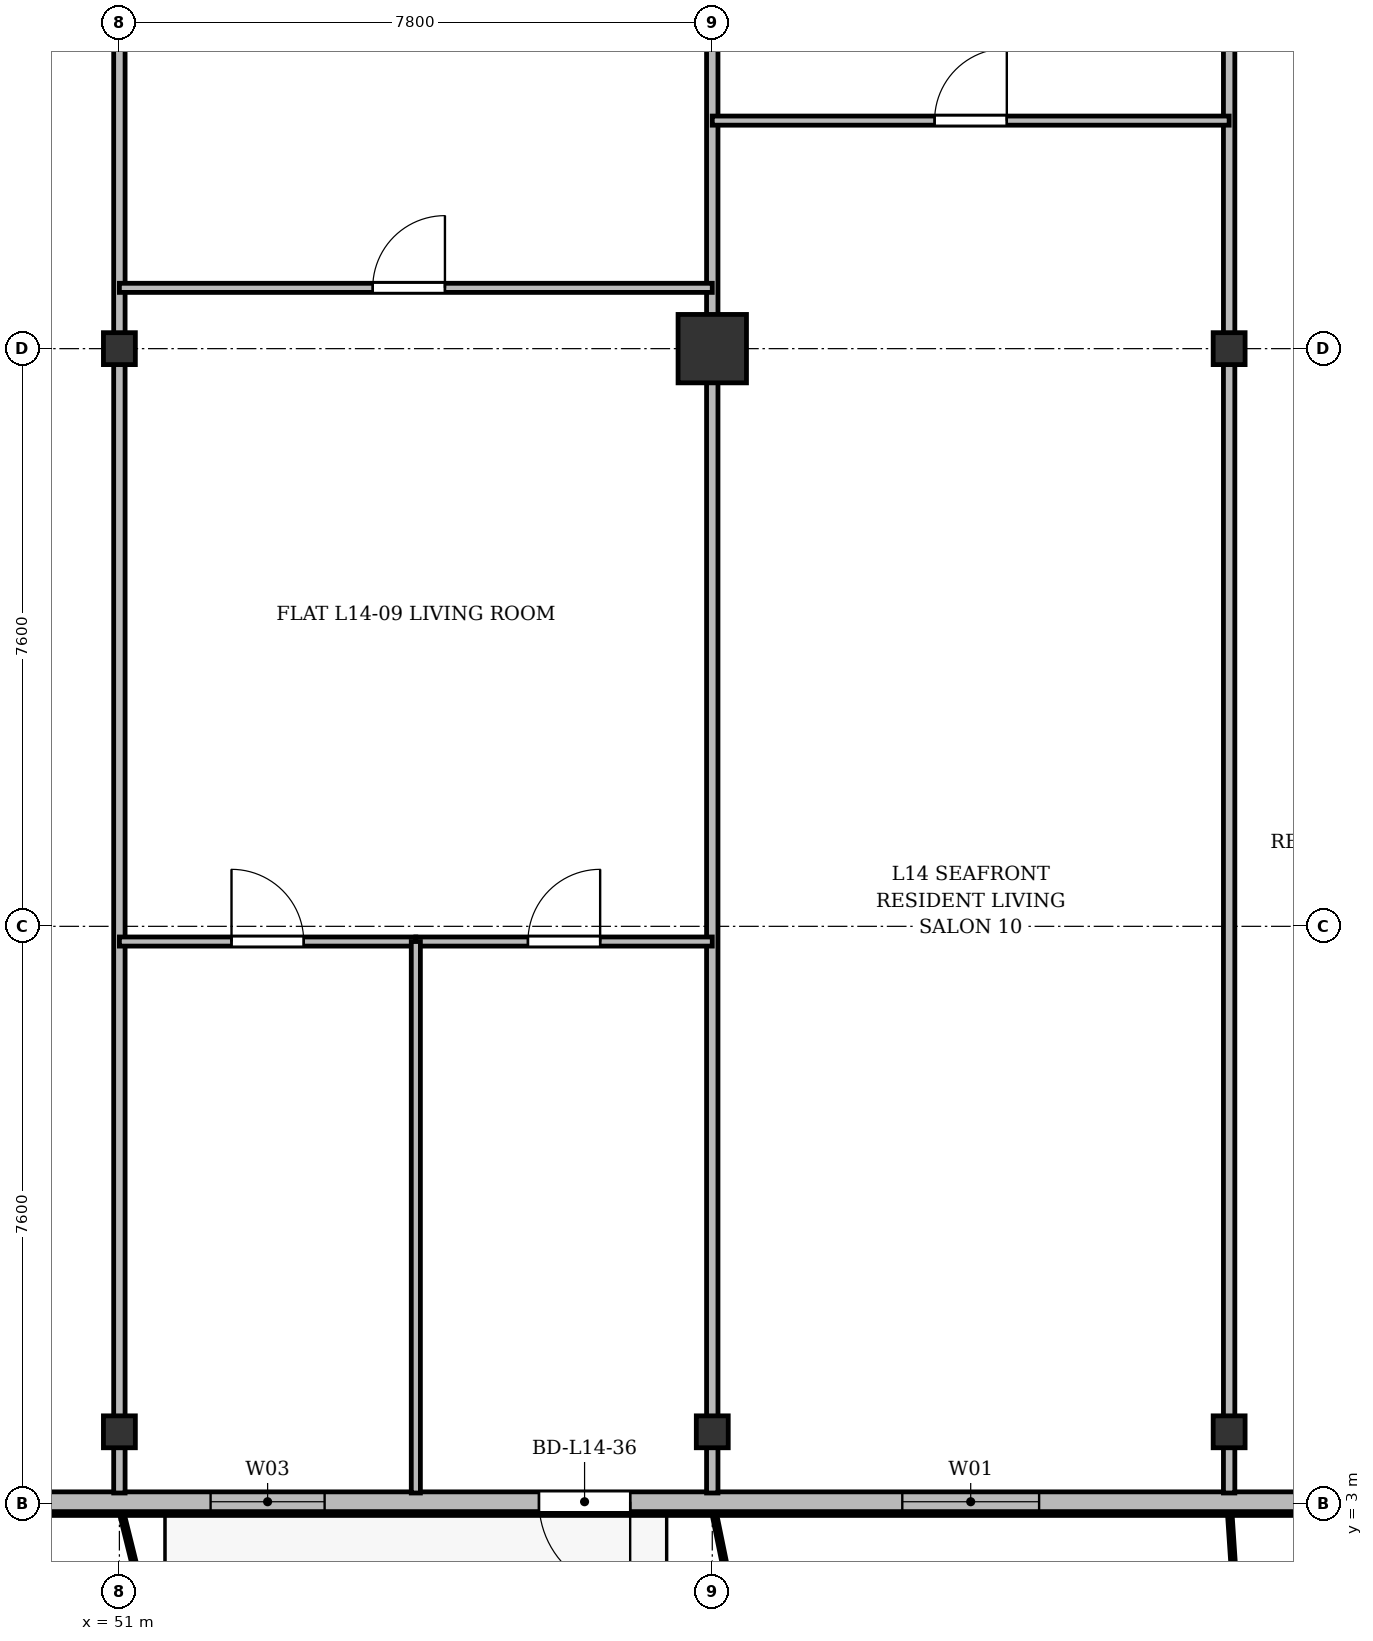
"""IFC4 building model, lengths in metres.
Left out: names, types, materials, properties, quantities, classifications, styles, units other than length and angle.
Written with IfcOpenShell. Run it as: python <this file> out.ifc"""

import sys

from ifc_helpers import new_model, si_unit, direction, frame, frame_2d, origin, origin_2d, place, context, subcontext, project, spatial, rectangle, i_section, extrude, source, transform, mapped, element, fill, save


model = new_model("IFC4")
c1 = context("Model", 3, precision=1e-05, world=origin(), true_north=direction((0.0, 1.0)))
c2 = subcontext(c1, "Body", "Model", "MODEL_VIEW")
j1 = project(units=[si_unit("LENGTHUNIT", "METRE"), si_unit("PLANEANGLEUNIT", "RADIAN")], contexts=[c1])
p1 = place(None, origin())
s1 = spatial("IfcSite", under=j1, at=p1, CompositionType="ELEMENT")
p2 = place(p1, origin())
s2 = spatial("IfcBuilding", under=s1, at=p2, CompositionType="ELEMENT")
p3 = place(p2, frame((0.0, 0.0, 55.9)))
s3 = spatial("IfcBuildingStorey", under=s2, at=p3, CompositionType="ELEMENT", Elevation=55.9)
m1 = source(origin(), c2, "Body", "SweptSolid", [
    extrude(i_section(OverallWidth=0.42, OverallDepth=0.42, WebThickness=0.026, FlangeThickness=0.04, at=origin_2d()), origin(), (0.0, 0.0, 1.0), 3.6),
])
for number, where, z_axis, x_axis in (
    (1, (51.0, 3.95, 0.0), (0.0, 0.0, 1.0), (1.0, 0.0, 0.0)),
    (2, (51.0, 18.2, 0.0), (0.0, 0.0, 1.0), (1.0, 0.0, 0.0)),
    (3, (58.8, 3.95, 0.0), (0.0, 0.0, 1.0), (1.0, 0.0, 0.0)),
):
    element("IfcColumn", number, at=place(p3, frame(where, z_axis=z_axis, x_axis=x_axis)), inside=s3, PredefinedType="COLUMN", context=c2, shape_type="MappedRepresentation", body=[
        mapped(m1, transform((0.0, 0.0, 0.0), x_axis=(1.0, 0.0, 0.0), y_axis=(0.0, 1.0, 0.0), z_axis=(0.0, 0.0, 1.0), scale=1.0)),
    ])
m2 = source(origin(), c2, "Body", "SweptSolid", [
    extrude(rectangle(XDim=0.9, YDim=0.9, at=origin_2d()), origin(), (0.0, 0.0, 1.0), 3.6),
])
p4 = place(p3, frame((58.8, 18.2, 0.0), z_axis=(0.0, 0.0, 1.0), x_axis=(1.0, 0.0, 0.0)))
e4 = element("IfcColumn", 4, at=p4, inside=s3, PredefinedType="COLUMN", context=c2, shape_type="MappedRepresentation", body=[
    mapped(m2, transform((0.0, 0.0, 0.0), x_axis=(1.0, 0.0, 0.0), y_axis=(0.0, 1.0, 0.0), z_axis=(0.0, 0.0, 1.0), scale=1.0)),
])
for number, where, z_axis, x_axis in (
    (5, (65.6, 3.95, 0.0), (0.0, 0.0, 1.0), (1.0, 0.0, 0.0)),
    (6, (65.6, 18.2, 0.0), (0.0, 0.0, 1.0), (1.0, 0.0, 0.0)),
):
    element("IfcColumn", number, at=place(p3, frame(where, z_axis=z_axis, x_axis=x_axis)), inside=s3, PredefinedType="COLUMN", context=c2, shape_type="MappedRepresentation", body=[
        mapped(m1, transform((0.0, 0.0, 0.0), x_axis=(1.0, 0.0, 0.0), y_axis=(0.0, 1.0, 0.0), z_axis=(0.0, 0.0, 1.0), scale=1.0)),
    ])
p5 = place(p3, frame((66.9, 3.03, 0.0), z_axis=(0.0, 0.0, 1.0), x_axis=(-1.0, 0.0, 0.0)))
e7 = element("IfcWall", 7, at=p5, inside=s3, PredefinedType="SOLIDWALL", context=c2, shape_type="SweptSolid", body=[
    extrude(rectangle(XDim=59.4, YDim=0.26, at=frame_2d((29.7, 0.0))), origin(), (0.0, 0.0, 1.0), 3.34),
])
p6 = place(p5, frame((3.8, 0.0, 0.9)))
e8 = element("IfcOpeningElement", 8, at=p6, cuts=e7, PredefinedType="OPENING", context=c2, shape_type="SweptSolid", body=[
    extrude(rectangle(XDim=1.8, YDim=1.8, at=frame_2d((0.9, 0.9))), frame((0.0, 0.14, 0.0), z_axis=(0.0, -1.0, 0.0), x_axis=(1.0, 0.0, 0.0)), (0.0, 0.0, 1.0), 0.28),
])
p7 = place(p5, frame((9.18, 0.0, 0.0)))
e9 = element("IfcOpeningElement", 9, at=p7, cuts=e7, PredefinedType="OPENING", context=c2, shape_type="SweptSolid", body=[
    extrude(rectangle(XDim=1.2, YDim=2.2, at=frame_2d((0.6, 1.1))), frame((0.0, 0.14, 0.0), z_axis=(0.0, -1.0, 0.0), x_axis=(1.0, 0.0, 0.0)), (0.0, 0.0, 1.0), 0.28),
])
p8 = place(p5, frame((13.2, 0.0, 0.9)))
e10 = element("IfcOpeningElement", 10, at=p8, cuts=e7, PredefinedType="OPENING", context=c2, shape_type="SweptSolid", body=[
    extrude(rectangle(XDim=1.5, YDim=1.75, at=frame_2d((0.75, 0.875))), frame((0.0, 0.14, 0.0), z_axis=(0.0, -1.0, 0.0), x_axis=(1.0, 0.0, 0.0)), (0.0, 0.0, 1.0), 0.28),
])
p9 = place(p5, frame((18.5, 0.0, 0.9)))
e11 = element("IfcOpeningElement", 11, at=p9, cuts=e7, PredefinedType="OPENING", context=c2, shape_type="SweptSolid", body=[
    extrude(rectangle(XDim=2.0, YDim=1.95, at=frame_2d((1.0, 0.975))), frame((0.0, 0.14, 0.0), z_axis=(0.0, -1.0, 0.0), x_axis=(1.0, 0.0, 0.0)), (0.0, 0.0, 1.0), 0.28),
])
p10 = place(p5, frame((24.175, 0.0, 0.9)))
e12 = element("IfcOpeningElement", 12, at=p10, cuts=e7, PredefinedType="OPENING", context=c2, shape_type="SweptSolid", body=[
    extrude(rectangle(XDim=1.65, YDim=1.85, at=frame_2d((0.825, 0.925))), frame((0.0, 0.14, 0.0), z_axis=(0.0, -1.0, 0.0), x_axis=(1.0, 0.0, 0.0)), (0.0, 0.0, 1.0), 0.28),
])
p11 = place(p5, frame((28.3, 0.0, 0.9)))
e13 = element("IfcOpeningElement", 13, at=p11, cuts=e7, PredefinedType="OPENING", context=c2, shape_type="SweptSolid", body=[
    extrude(rectangle(XDim=1.8, YDim=1.8, at=frame_2d((0.9, 0.9))), frame((0.0, 0.14, 0.0), z_axis=(0.0, -1.0, 0.0), x_axis=(1.0, 0.0, 0.0)), (0.0, 0.0, 1.0), 0.28),
])
p12 = place(p5, frame((32.8, 0.0, 0.9)))
e14 = element("IfcOpeningElement", 14, at=p12, cuts=e7, PredefinedType="OPENING", context=c2, shape_type="SweptSolid", body=[
    extrude(rectangle(XDim=2.2, YDim=1.8, at=frame_2d((1.1, 0.9))), frame((0.0, 0.14, 0.0), z_axis=(0.0, -1.0, 0.0), x_axis=(1.0, 0.0, 0.0)), (0.0, 0.0, 1.0), 0.28),
])
p13 = place(p5, frame((40.301, 0.0, 0.0)))
e15 = element("IfcOpeningElement", 15, at=p13, cuts=e7, PredefinedType="OPENING", context=c2, shape_type="SweptSolid", body=[
    extrude(rectangle(XDim=1.2, YDim=2.2, at=frame_2d((0.6, 1.1))), frame((0.0, 0.14, 0.0), z_axis=(0.0, -1.0, 0.0), x_axis=(1.0, 0.0, 0.0)), (0.0, 0.0, 1.0), 0.28),
])
p14 = place(p5, frame((46.4, 0.0, 0.9)))
e16 = element("IfcOpeningElement", 16, at=p14, cuts=e7, PredefinedType="OPENING", context=c2, shape_type="SweptSolid", body=[
    extrude(rectangle(XDim=2.0, YDim=1.95, at=frame_2d((1.0, 0.975))), frame((0.0, 0.14, 0.0), z_axis=(0.0, -1.0, 0.0), x_axis=(1.0, 0.0, 0.0)), (0.0, 0.0, 1.0), 0.28),
])
p15 = place(p5, frame((53.136, 0.0, 0.0)))
e17 = element("IfcOpeningElement", 17, at=p15, cuts=e7, PredefinedType="OPENING", context=c2, shape_type="SweptSolid", body=[
    extrude(rectangle(XDim=1.2, YDim=2.2, at=frame_2d((0.6, 1.1))), frame((0.0, 0.14, 0.0), z_axis=(0.0, -1.0, 0.0), x_axis=(1.0, 0.0, 0.0)), (0.0, 0.0, 1.0), 0.28),
])
p16 = place(p5, frame((55.5, 0.0, 0.9)))
e18 = element("IfcOpeningElement", 18, at=p16, cuts=e7, PredefinedType="OPENING", context=c2, shape_type="SweptSolid", body=[
    extrude(rectangle(XDim=1.8, YDim=1.8, at=frame_2d((0.9, 0.9))), frame((0.0, 0.14, 0.0), z_axis=(0.0, -1.0, 0.0), x_axis=(1.0, 0.0, 0.0)), (0.0, 0.0, 1.0), 0.28),
])
for number, where, z_axis, x_axis in (
    (19, (51.0, 3.145, 0.0), (0.0, 0.0, 1.0), (0.0, 1.0, 0.0)),
    (20, (58.8, 3.145, 0.0), (0.0, 0.0, 1.0), (0.0, 1.0, 0.0)),
    (21, (65.6, 3.145, 0.0), (0.0, 0.0, 1.0), (0.0, 1.0, 0.0)),
):
    element("IfcWall", number, at=place(p3, frame(where, z_axis=z_axis, x_axis=x_axis)), inside=s3, PredefinedType="PARTITIONING", context=c2, shape_type="SweptSolid", body=[
        extrude(rectangle(XDim=24.455, YDim=0.15, at=frame_2d((12.228, 0.0))), origin(), (0.0, 0.0, 1.0), 2.752),
    ])
p17 = place(p3, frame((51.0, 19.0, 0.0), z_axis=(0.0, 0.0, 1.0), x_axis=(1.0, 0.0, 0.0)))
e22 = element("IfcWall", 22, at=p17, inside=s3, PredefinedType="PARTITIONING", context=c2, shape_type="SweptSolid", body=[
    extrude(rectangle(XDim=7.8, YDim=0.12, at=frame_2d((3.9, 0.0))), origin(), (0.0, 0.0, 1.0), 2.752),
])
p18 = place(p17, frame((3.333, 0.0, 0.0)))
e23 = element("IfcOpeningElement", 23, at=p18, cuts=e22, PredefinedType="OPENING", context=c2, shape_type="SweptSolid", body=[
    extrude(rectangle(XDim=0.95, YDim=2.15, at=frame_2d((0.475, 1.075))), frame((0.0, 0.07, 0.0), z_axis=(0.0, -1.0, 0.0), x_axis=(1.0, 0.0, 0.0)), (0.0, 0.0, 1.0), 0.14),
])
p19 = place(p3, frame((51.0, 10.4, 0.0), z_axis=(0.0, 0.0, 1.0), x_axis=(1.0, 0.0, 0.0)))
e24 = element("IfcWall", 24, at=p19, inside=s3, PredefinedType="PARTITIONING", context=c2, shape_type="SweptSolid", body=[
    extrude(rectangle(XDim=3.9, YDim=0.12, at=frame_2d((1.95, 0.0))), origin(), (0.0, 0.0, 1.0), 2.752),
])
p20 = place(p19, frame((1.475, 0.0, 0.0)))
e25 = element("IfcOpeningElement", 25, at=p20, cuts=e24, PredefinedType="OPENING", context=c2, shape_type="SweptSolid", body=[
    extrude(rectangle(XDim=0.95, YDim=2.15, at=frame_2d((0.475, 1.075))), frame((0.0, 0.07, 0.0), z_axis=(0.0, -1.0, 0.0), x_axis=(1.0, 0.0, 0.0)), (0.0, 0.0, 1.0), 0.14),
])
p21 = place(p3, frame((54.9, 10.4, 0.0), z_axis=(0.0, 0.0, 1.0), x_axis=(1.0, 0.0, 0.0)))
e26 = element("IfcWall", 26, at=p21, inside=s3, PredefinedType="PARTITIONING", context=c2, shape_type="SweptSolid", body=[
    extrude(rectangle(XDim=3.9, YDim=0.12, at=frame_2d((1.95, 0.0))), origin(), (0.0, 0.0, 1.0), 2.752),
])
p22 = place(p21, frame((1.475, 0.0, 0.0)))
e27 = element("IfcOpeningElement", 27, at=p22, cuts=e26, PredefinedType="OPENING", context=c2, shape_type="SweptSolid", body=[
    extrude(rectangle(XDim=0.95, YDim=2.15, at=frame_2d((0.475, 1.075))), frame((0.0, 0.07, 0.0), z_axis=(0.0, -1.0, 0.0), x_axis=(1.0, 0.0, 0.0)), (0.0, 0.0, 1.0), 0.14),
])
p23 = place(p3, frame((54.9, 3.145, 0.0), z_axis=(0.0, 0.0, 1.0), x_axis=(0.0, 1.0, 0.0)))
e28 = element("IfcWall", 28, at=p23, inside=s3, PredefinedType="PARTITIONING", context=c2, shape_type="SweptSolid", body=[
    extrude(rectangle(XDim=7.255, YDim=0.12, at=frame_2d((3.627, 0.0))), origin(), (0.0, 0.0, 1.0), 2.69),
])
p24 = place(p3, frame((58.8, 21.2, 0.0), z_axis=(0.0, 0.0, 1.0), x_axis=(1.0, 0.0, 0.0)))
e29 = element("IfcWall", 29, at=p24, inside=s3, PredefinedType="PARTITIONING", context=c2, shape_type="SweptSolid", body=[
    extrude(rectangle(XDim=6.8, YDim=0.12, at=frame_2d((3.4, 0.0))), origin(), (0.0, 0.0, 1.0), 2.752),
])
p25 = place(p24, frame((2.925, 0.0, 0.0)))
e30 = element("IfcOpeningElement", 30, at=p25, cuts=e29, PredefinedType="OPENING", context=c2, shape_type="SweptSolid", body=[
    extrude(rectangle(XDim=0.95, YDim=2.15, at=frame_2d((0.475, 1.075))), frame((0.0, 0.07, 0.0), z_axis=(0.0, -1.0, 0.0), x_axis=(1.0, 0.0, 0.0)), (0.0, 0.0, 1.0), 0.14),
])
m3 = source(origin(), c2, "Body", "SweptSolid", [
    extrude(rectangle(XDim=1.8, YDim=1.8, at=frame_2d((0.9, 0.9))), frame((0.0, 0.03, 0.0), z_axis=(0.0, -1.0, 0.0), x_axis=(1.0, 0.0, 0.0)), (0.0, 0.0, 1.0), 0.06),
])
p26 = place(p6, origin())
e31 = element("IfcWindow", 31, at=p26, inside=s3, PartitioningType="SINGLE_PANEL", PredefinedType="WINDOW", context=c2, shape_type="MappedRepresentation", body=[
    mapped(m3, transform((0.0, 0.0, 0.0), x_axis=(1.0, 0.0, 0.0), y_axis=(0.0, 1.0, 0.0), z_axis=(0.0, 0.0, 1.0), scale=1.0)),
])
fill(e8, e31)
m4 = source(origin(), c2, "Body", "SweptSolid", [
    extrude(rectangle(XDim=1.2, YDim=2.2, at=frame_2d((0.6, 1.1))), frame((0.0, 0.025, 0.0), z_axis=(0.0, -1.0, 0.0), x_axis=(1.0, 0.0, 0.0)), (0.0, 0.0, 1.0), 0.05),
])
p27 = place(p7, origin())
e32 = element("IfcDoor", 32, at=p27, inside=s3, OperationType="SINGLE_SWING_LEFT", PredefinedType="DOOR", context=c2, shape_type="MappedRepresentation", body=[
    mapped(m4, transform((0.0, 0.0, 0.0), x_axis=(1.0, 0.0, 0.0), y_axis=(0.0, 1.0, 0.0), z_axis=(0.0, 0.0, 1.0), scale=1.0)),
])
fill(e9, e32)
m5 = source(origin(), c2, "Body", "SweptSolid", [
    extrude(rectangle(XDim=1.5, YDim=1.75, at=frame_2d((0.75, 0.875))), frame((0.0, 0.03, 0.0), z_axis=(0.0, -1.0, 0.0), x_axis=(1.0, 0.0, 0.0)), (0.0, 0.0, 1.0), 0.06),
])
p28 = place(p8, origin())
e33 = element("IfcWindow", 33, at=p28, inside=s3, PartitioningType="SINGLE_PANEL", PredefinedType="WINDOW", context=c2, shape_type="MappedRepresentation", body=[
    mapped(m5, transform((0.0, 0.0, 0.0), x_axis=(1.0, 0.0, 0.0), y_axis=(0.0, 1.0, 0.0), z_axis=(0.0, 0.0, 1.0), scale=1.0)),
])
fill(e10, e33)
m6 = source(origin(), c2, "Body", "SweptSolid", [
    extrude(rectangle(XDim=0.95, YDim=2.15, at=frame_2d((0.475, 1.075))), frame((0.0, 0.025, 0.0), z_axis=(0.0, -1.0, 0.0), x_axis=(1.0, 0.0, 0.0)), (0.0, 0.0, 1.0), 0.05),
])
p29 = place(p18, origin())
e34 = element("IfcDoor", 34, at=p29, inside=s3, OperationType="SINGLE_SWING_RIGHT", PredefinedType="DOOR", context=c2, shape_type="MappedRepresentation", body=[
    mapped(m6, transform((0.0, 0.0, 0.0), x_axis=(1.0, 0.0, 0.0), y_axis=(0.0, 1.0, 0.0), z_axis=(0.0, 0.0, 1.0), scale=1.0)),
])
fill(e23, e34)
p30 = place(p20, origin())
e35 = element("IfcDoor", 35, at=p30, inside=s3, OperationType="SINGLE_SWING_LEFT", PredefinedType="DOOR", context=c2, shape_type="MappedRepresentation", body=[
    mapped(m6, transform((0.0, 0.0, 0.0), x_axis=(1.0, 0.0, 0.0), y_axis=(0.0, 1.0, 0.0), z_axis=(0.0, 0.0, 1.0), scale=1.0)),
])
fill(e25, e35)
p31 = place(p22, origin())
e36 = element("IfcDoor", 36, at=p31, inside=s3, OperationType="SINGLE_SWING_RIGHT", PredefinedType="DOOR", context=c2, shape_type="MappedRepresentation", body=[
    mapped(m6, transform((0.0, 0.0, 0.0), x_axis=(1.0, 0.0, 0.0), y_axis=(0.0, 1.0, 0.0), z_axis=(0.0, 0.0, 1.0), scale=1.0)),
])
fill(e27, e36)
p32 = place(p25, origin())
e37 = element("IfcDoor", 37, at=p32, inside=s3, OperationType="SINGLE_SWING_RIGHT", PredefinedType="DOOR", context=c2, shape_type="MappedRepresentation", body=[
    mapped(m6, transform((0.0, 0.0, 0.0), x_axis=(1.0, 0.0, 0.0), y_axis=(0.0, 1.0, 0.0), z_axis=(0.0, 0.0, 1.0), scale=1.0)),
])
fill(e30, e37)
save(model, sys.argv[1])
